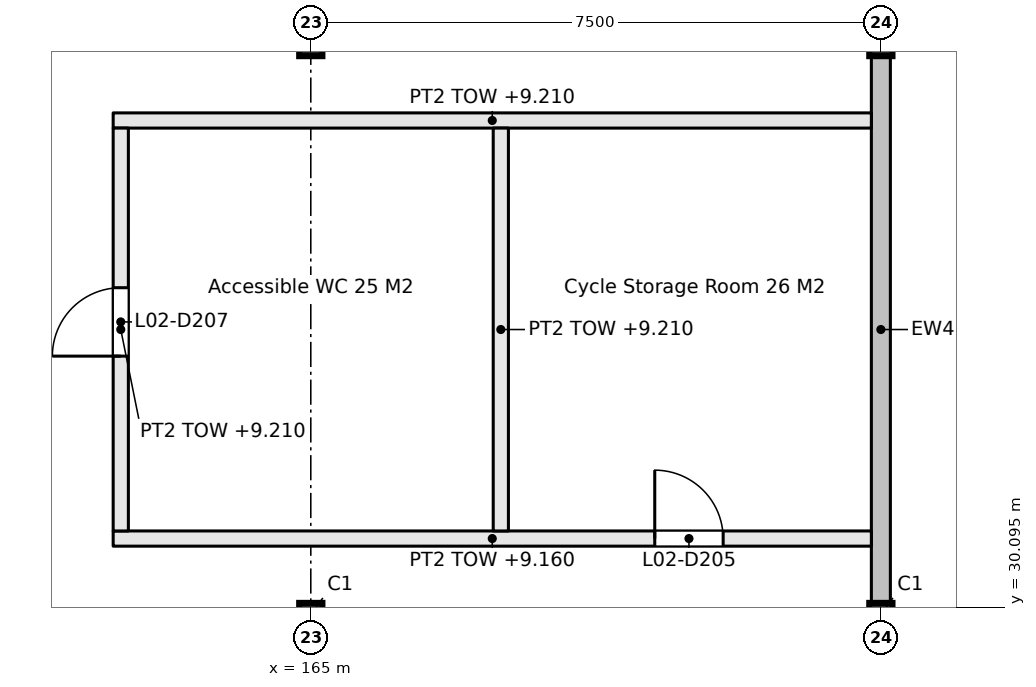
"""IFC4 building model, lengths in metres.
Left out: names, types, materials, properties, quantities, classifications, styles, units other than length and angle.
Written with IfcOpenShell. Run it as: python <this file> out.ifc"""

import sys

from ifc_helpers import new_model, si_unit, direction, frame, frame_2d, origin, origin_2d, place, context, subcontext, project, spatial, rectangle, i_section, extrude, element, fill, save


model = new_model("IFC4")
c1 = context("Model", 3, precision=1e-05, world=origin(), true_north=direction((0.0, 1.0)))
c2 = subcontext(c1, "Body", "Model", "MODEL_VIEW")
j1 = project(units=[si_unit("LENGTHUNIT", "METRE"), si_unit("PLANEANGLEUNIT", "RADIAN")], contexts=[c1])
p1 = place(None, origin())
s1 = spatial("IfcSite", under=j1, at=p1, CompositionType="ELEMENT")
p2 = place(p1, origin())
s2 = spatial("IfcBuilding", under=s1, at=p2, CompositionType="ELEMENT")
p3 = place(p2, frame((0.0, 0.0, 6.6)))
s3 = spatial("IfcBuildingStorey", under=s2, at=p3, CompositionType="ELEMENT", Elevation=6.6)
for number, where, z_axis, x_axis in (
    (1, (165.0, 30.0, 0.0), (0.0, 0.0, 1.0), (1.0, 0.0, 0.0)),
    (2, (165.0, 37.5, 0.0), (0.0, 0.0, 1.0), (1.0, 0.0, 0.0)),
    (3, (172.5, 30.0, 0.0), (0.0, 0.0, 1.0), (1.0, 0.0, 0.0)),
    (4, (172.5, 37.5, 0.0), (0.0, 0.0, 1.0), (1.0, 0.0, 0.0)),
):
    element("IfcColumn", number, at=place(p3, frame(where, z_axis=z_axis, x_axis=x_axis)), inside=s3, PredefinedType="COLUMN", context=c2, shape_type="SweptSolid", body=[
        extrude(i_section(OverallWidth=0.305, OverallDepth=0.307, WebThickness=0.01, FlangeThickness=0.015, FilletRadius=0.015, at=origin_2d()), origin(), (0.0, 0.0, 1.0), 3.3),
    ])
p4 = place(p3, frame((162.4, 31.0, 0.0), z_axis=(0.0, 0.0, 1.0), x_axis=(1.0, 0.0, 0.0)))
e5 = element("IfcWall", 5, at=p4, inside=s3, PredefinedType="PARTITIONING", context=c2, shape_type="SweptSolid", body=[
    extrude(rectangle(XDim=9.975, YDim=0.2, at=frame_2d((4.988, 0.0))), origin(), (0.0, 0.0, 1.0), 2.56),
])
p5 = place(p4, frame((7.125, 0.0, 0.0)))
e6 = element("IfcOpeningElement", 6, at=p5, cuts=e5, PredefinedType="OPENING", context=c2, shape_type="SweptSolid", body=[
    extrude(rectangle(XDim=0.9, YDim=2.1, at=frame_2d((0.45, 1.05))), frame((0.0, 0.11, 0.0), z_axis=(0.0, -1.0, 0.0), x_axis=(1.0, 0.0, 0.0)), (0.0, 0.0, 1.0), 0.22),
])
p6 = place(p3, frame((162.4, 36.5, 0.0), z_axis=(0.0, 0.0, 1.0), x_axis=(1.0, 0.0, 0.0)))
e7 = element("IfcWall", 7, at=p6, inside=s3, PredefinedType="PARTITIONING", context=c2, shape_type="SweptSolid", body=[
    extrude(rectangle(XDim=9.975, YDim=0.2, at=frame_2d((4.988, 0.0))), origin(), (0.0, 0.0, 1.0), 2.61),
])
p7 = place(p3, frame((162.5, 31.1, 0.0), z_axis=(0.0, 0.0, 1.0), x_axis=(0.0, 1.0, 0.0)))
e8 = element("IfcWall", 8, at=p7, inside=s3, PredefinedType="PARTITIONING", context=c2, shape_type="SweptSolid", body=[
    extrude(rectangle(XDim=5.3, YDim=0.2, at=frame_2d((2.65, 0.0))), origin(), (0.0, 0.0, 1.0), 2.61),
])
p8 = place(p7, frame((2.3, 0.0, 0.0)))
e9 = element("IfcOpeningElement", 9, at=p8, cuts=e8, PredefinedType="OPENING", context=c2, shape_type="SweptSolid", body=[
    extrude(rectangle(XDim=0.9, YDim=2.1, at=frame_2d((0.45, 1.05))), frame((0.0, 0.11, 0.0), z_axis=(0.0, -1.0, 0.0), x_axis=(1.0, 0.0, 0.0)), (0.0, 0.0, 1.0), 0.22),
])
p9 = place(p3, frame((167.5, 31.1, 0.0), z_axis=(0.0, 0.0, 1.0), x_axis=(0.0, 1.0, 0.0)))
e10 = element("IfcWall", 10, at=p9, inside=s3, PredefinedType="PARTITIONING", context=c2, shape_type="SweptSolid", body=[
    extrude(rectangle(XDim=5.3, YDim=0.2, at=frame_2d((2.65, 0.0))), origin(), (0.0, 0.0, 1.0), 2.61),
])
p10 = place(p3, frame((172.5, 30.154, 0.0), z_axis=(0.0, 0.0, 1.0), x_axis=(0.0, 1.0, 0.0)))
e11 = element("IfcWall", 11, at=p10, inside=s3, PredefinedType="SOLIDWALL", context=c2, shape_type="SweptSolid", body=[
    extrude(rectangle(XDim=7.193, YDim=0.25, at=frame_2d((3.596, 0.0))), origin(), (0.0, 0.0, 1.0), 5.44),
])
p11 = place(p5, origin())
e12 = element("IfcDoor", 12, at=p11, inside=s3, OperationType="SINGLE_SWING_RIGHT", PredefinedType="DOOR", context=c2, shape_type="SweptSolid", body=[
    extrude(rectangle(XDim=0.9, YDim=2.1, at=frame_2d((0.45, 1.05))), frame((0.0, 0.025, 0.0), z_axis=(0.0, -1.0, 0.0), x_axis=(1.0, 0.0, 0.0)), (0.0, 0.0, 1.0), 0.05),
])
fill(e6, e12)
p12 = place(p8, origin())
e13 = element("IfcDoor", 13, at=p12, inside=s3, OperationType="SINGLE_SWING_RIGHT", PredefinedType="DOOR", context=c2, shape_type="SweptSolid", body=[
    extrude(rectangle(XDim=0.9, YDim=2.1, at=frame_2d((0.45, 1.05))), frame((0.0, 0.025, 0.0), z_axis=(0.0, -1.0, 0.0), x_axis=(1.0, 0.0, 0.0)), (0.0, 0.0, 1.0), 0.05),
])
fill(e9, e13)
save(model, sys.argv[1])
